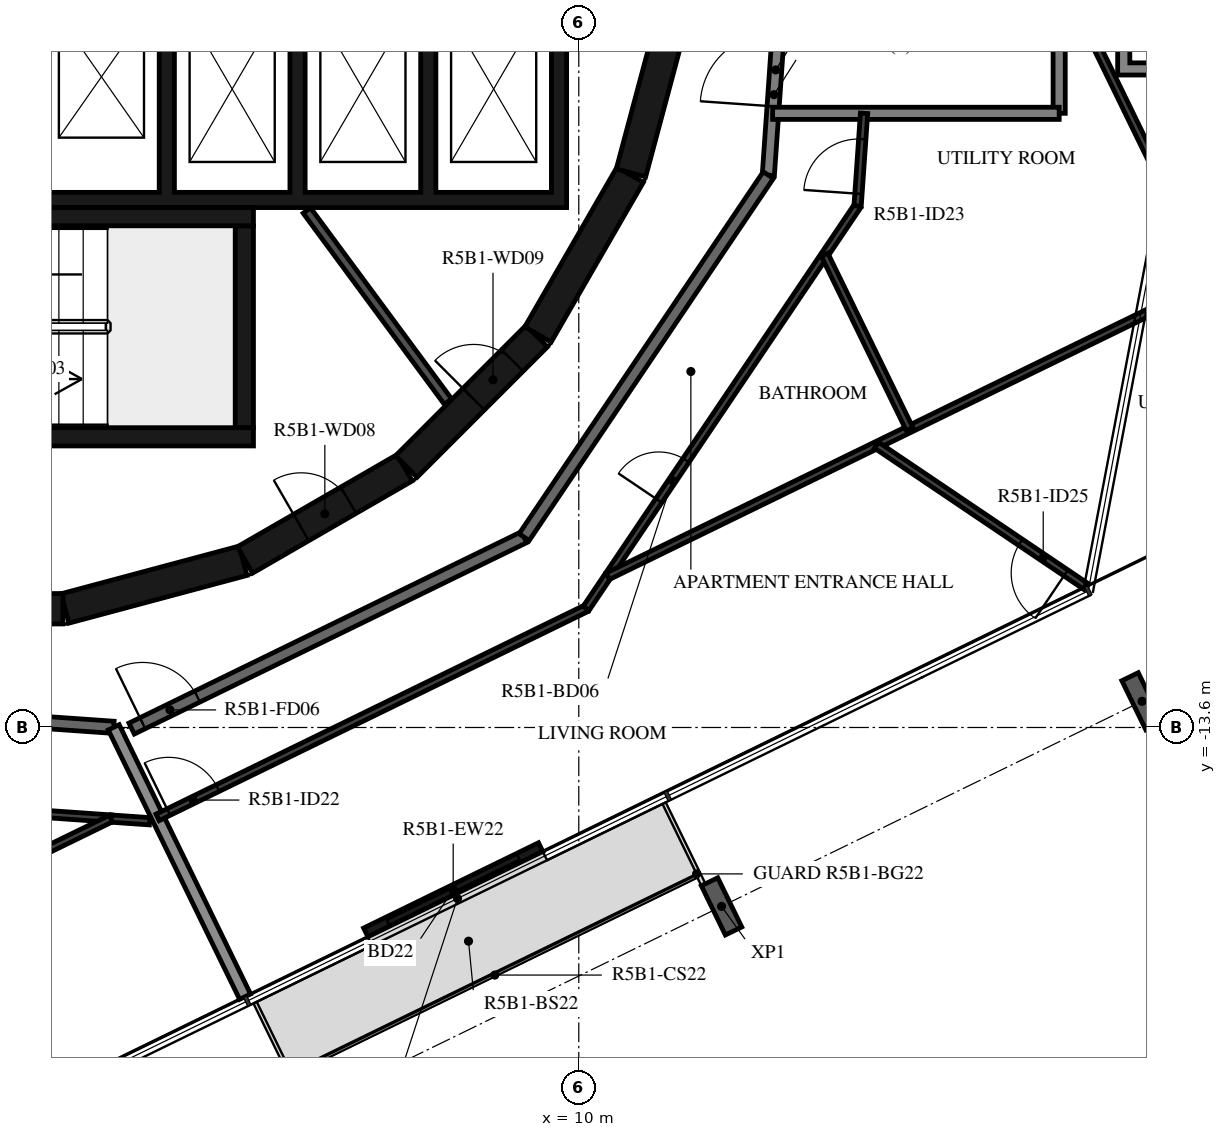
"""IFC4 building model, lengths in metres.
Left out: names, types, materials, properties, quantities, classifications, styles, units other than length and angle.
Written with IfcOpenShell. Run it as: python <this file> out.ifc"""

import sys

from ifc_helpers import new_model, si_unit, direction, frame, frame_2d, origin, origin_2d, place, context, subcontext, project, spatial, polyline, rectangle, i_section, outline, extrude, element, fill, save


model = new_model("IFC4")
c1 = context("Model", 3, precision=1e-05, world=origin(), true_north=direction((0.0, 1.0)))
c2 = subcontext(c1, "Body", "Model", "MODEL_VIEW")
j1 = project(units=[si_unit("LENGTHUNIT", "METRE"), si_unit("PLANEANGLEUNIT", "RADIAN")], contexts=[c1])
p1 = place(None, origin())
s1 = spatial("IfcSite", under=j1, at=p1, CompositionType="ELEMENT")
p2 = place(p1, origin())
s2 = spatial("IfcBuilding", under=s1, at=p2, CompositionType="ELEMENT")
p3 = place(p2, frame((0.0, 0.0, 198.9)))
s3 = spatial("IfcBuildingStorey", under=s2, at=p3, CompositionType="ELEMENT", Elevation=198.9)
for number, where, z_axis, x_axis in (
    (1, (12.348, -16.542, -0.38), (0.0, 0.0, 1.0), (-0.899, -0.438, 0.0)),
    (2, (19.263, -13.169, -0.38), (0.0, 0.0, 1.0), (-0.899, -0.438, 0.0)),
):
    element("IfcColumn", number, at=place(p3, frame(where, z_axis=z_axis, x_axis=x_axis)), inside=s3, PredefinedType="COLUMN", context=c2, shape_type="SweptSolid", body=[
        extrude(i_section(OverallWidth=0.3, OverallDepth=0.9, WebThickness=0.019, FlangeThickness=0.035, FilletRadius=0.03, at=origin_2d()), origin(), (0.0, 0.0, 1.0), 3.5),
    ])
p4 = place(p3, frame((6.497, -16.97, 0.0), z_axis=(0.0, 0.0, 1.0), x_axis=(0.898778711213, 0.43840258698, 0.0)))
e3 = element("IfcWall", 3, at=p4, inside=s3, PredefinedType="STANDARD", context=c2, shape_type="SweptSolid", body=[
    extrude(rectangle(XDim=3.2, YDim=0.16, at=frame_2d((1.6, 0.0))), origin(), (0.0, 0.0, 1.0), 3.12),
])
p5 = place(p4, frame((0.4, 0.0, 0.0)))
e4 = element("IfcOpeningElement", 4, at=p5, cuts=e3, PredefinedType="OPENING", context=c2, shape_type="SweptSolid", body=[
    extrude(rectangle(XDim=2.4, YDim=2.4, at=frame_2d((1.2, 1.2))), frame((0.0, 0.09, 0.0), z_axis=(0.0, -1.0, 0.0), x_axis=(1.0, 0.0, 0.0)), (0.0, 0.0, 1.0), 0.18),
])
p6 = place(p3, frame((1.55, -11.643, 0.0), z_axis=(0.0, 0.0, 1.0), x_axis=(0.965948410781, 0.258734743916, 0.0)))
e5 = element("IfcWall", 5, at=p6, inside=s3, PredefinedType="SHEAR", context=c2, shape_type="SweptSolid", body=[
    extrude(rectangle(XDim=3.033, YDim=0.5, at=frame_2d((1.516, 0.0))), origin(), (0.0, 0.0, 1.0), 3.12),
])
p7 = place(p3, frame((4.51, -10.845, 0.0), z_axis=(0.0, 0.0, 1.0), x_axis=(0.865975092491, 0.500087131594, 0.0)))
e6 = element("IfcWall", 6, at=p7, inside=s3, PredefinedType="SHEAR", context=c2, shape_type="SweptSolid", body=[
    extrude(rectangle(XDim=3.033, YDim=0.5, at=frame_2d((1.516, 0.0))), origin(), (0.0, 0.0, 1.0), 3.12),
])
p8 = place(p7, frame((1.066, 0.0, 0.0)))
e7 = element("IfcOpeningElement", 7, at=p8, cuts=e6, PredefinedType="OPENING", context=c2, shape_type="SweptSolid", body=[
    extrude(rectangle(XDim=0.9, YDim=2.1, at=frame_2d((0.45, 1.05))), frame((0.0, 0.26, 0.0), z_axis=(0.0, -1.0, 0.0), x_axis=(1.0, 0.0, 0.0)), (0.0, 0.0, 1.0), 0.52),
])
p9 = place(p3, frame((7.164, -9.308, 0.0), z_axis=(0.0, 0.0, 1.0), x_axis=(0.707106781187, 0.707106781187, 0.0)))
e8 = element("IfcWall", 8, at=p9, inside=s3, PredefinedType="SHEAR", context=c2, shape_type="SweptSolid", body=[
    extrude(rectangle(XDim=3.032, YDim=0.5, at=frame_2d((1.516, 0.0))), origin(), (0.0, 0.0, 1.0), 3.12),
])
p10 = place(p9, frame((1.566, 0.0, 0.0)))
e9 = element("IfcOpeningElement", 9, at=p10, cuts=e8, PredefinedType="OPENING", context=c2, shape_type="SweptSolid", body=[
    extrude(rectangle(XDim=0.9, YDim=2.1, at=frame_2d((0.45, 1.05))), frame((0.0, 0.26, 0.0), z_axis=(0.0, -1.0, 0.0), x_axis=(1.0, 0.0, 0.0)), (0.0, 0.0, 1.0), 0.52),
])
for number, where, z_axis, x_axis in (
    (10, (9.329, -7.137, 0.0), (0.0, 0.0, 1.0), (0.5, 0.866, 0.0)),
    (11, (10.858, -4.479, 0.0), (0.0, 0.0, 1.0), (0.259, 0.966, 0.0)),
):
    element("IfcWall", number, at=place(p3, frame(where, z_axis=z_axis, x_axis=x_axis)), inside=s3, PredefinedType="SHEAR", context=c2, shape_type="SweptSolid", body=[
        extrude(rectangle(XDim=3.033, YDim=0.5, at=frame_2d((1.516, 0.0))), origin(), (0.0, 0.0, 1.0), 3.12),
    ])
p11 = place(p3, frame((-1.516, -11.647, 0.0), z_axis=(0.0, 0.0, 1.0), x_axis=(1.0, 0.0, 0.0)))
e12 = element("IfcWall", 12, at=p11, inside=s3, PredefinedType="SHEAR", context=c2, shape_type="SweptSolid", body=[
    extrude(rectangle(XDim=3.033, YDim=0.5, at=frame_2d((1.516, 0.0))), origin(), (0.0, 0.0, 1.0), 3.12),
])
p12 = place(p11, frame((0.016, 0.0, 0.0)))
e13 = element("IfcOpeningElement", 13, at=p12, cuts=e12, PredefinedType="OPENING", context=c2, shape_type="SweptSolid", body=[
    extrude(rectangle(XDim=1.2, YDim=2.1, at=frame_2d((0.6, 1.05))), frame((0.0, 0.26, 0.0), z_axis=(0.0, -1.0, 0.0), x_axis=(1.0, 0.0, 0.0)), (0.0, 0.0, 1.0), 0.52),
])
p13 = place(p3, frame((-2.4, -5.2, 0.0), z_axis=(0.0, 0.0, 1.0), x_axis=(1.0, 0.0, 0.0)))
e14 = element("IfcWall", 14, at=p13, inside=s3, PredefinedType="SHEAR", context=c2, shape_type="SweptSolid", body=[
    extrude(rectangle(XDim=7.05, YDim=0.3, at=frame_2d((3.525, 0.0))), origin(), (0.0, 0.0, 1.0), 3.12),
])
p14 = place(p3, frame((4.5, -8.67, 0.0), z_axis=(0.0, 0.0, 1.0), x_axis=(0.0, 1.0, 0.0)))
e15 = element("IfcWall", 15, at=p14, inside=s3, PredefinedType="SHEAR", context=c2, shape_type="SweptSolid", body=[
    extrude(rectangle(XDim=3.32, YDim=0.3, at=frame_2d((1.66, 0.0))), origin(), (0.0, 0.0, 1.0), 3.12),
])
p15 = place(p3, frame((0.1, -8.82, 0.0), z_axis=(0.0, 0.0, 1.0), x_axis=(1.0, 0.0, 0.0)))
e16 = element("IfcWall", 16, at=p15, inside=s3, PredefinedType="SHEAR", context=c2, shape_type="SweptSolid", body=[
    extrude(rectangle(XDim=4.55, YDim=0.3, at=frame_2d((2.275, 0.0))), origin(), (0.0, 0.0, 1.0), 3.12),
])
p16 = place(p3, origin())
e17 = element("IfcWall", 17, at=p16, inside=s3, PredefinedType="SHEAR", context=c2, shape_type="SweptSolid", body=[
    extrude(outline(polyline([(9.8, -5.05), (9.8, -4.8), (9.8, -1.9), (9.55, -1.9), (9.55, -4.8), (7.65, -4.8), (7.65, -1.9), (7.4, -1.9), (7.4, -4.8), (5.5, -4.8), (5.5, -1.9), (5.25, -1.9), (5.25, -4.8), (3.35, -4.8), (3.35, -1.9), (3.1, -1.9), (3.1, -4.8), (1.2, -4.8), (1.2, -1.9), (0.95, -1.9), (0.95, -4.8), (-0.95, -4.8), (-0.95, -1.9), (-1.2, -1.9), (-1.2, -4.8), (-3.1, -4.8), (-3.1, -1.9), (-3.35, -1.9), (-3.35, -4.8), (-5.25, -4.8), (-5.25, -1.9), (-5.5, -1.9), (-5.5, -4.8), (-7.4, -4.8), (-7.4, -1.9), (-7.65, -1.9), (-7.65, -4.8), (-9.55, -4.8), (-9.55, -1.9), (-9.8, -1.9), (-9.8, -4.8), (-9.8, -5.05), (9.8, -5.05)])), origin(), (0.0, 0.0, 1.0), 3.12),
])
p17 = place(p3, frame((5.528, -5.098, 0.0), z_axis=(0.0, 0.0, 1.0), x_axis=(0.594034318069, -0.804439698769, 0.0)))
e18 = element("IfcWall", 18, at=p17, inside=s3, PredefinedType="PARTITIONING", context=c2, shape_type="SweptSolid", body=[
    extrude(rectangle(XDim=3.907, YDim=0.15, at=frame_2d((1.953, 0.0))), origin(), (0.0, 0.0, 1.0), 3.12),
])
p18 = place(p3, frame((13.117, -4.517, 0.0), z_axis=(0.0, 0.0, 1.0), x_axis=(0.069736659613, 0.997565435601, 0.0)))
e19 = element("IfcWall", 19, at=p18, inside=s3, PredefinedType="STANDARD", context=c2, shape_type="SweptSolid", body=[
    extrude(rectangle(XDim=2.654, YDim=0.2, at=frame_2d((1.327, 0.0))), origin(), (0.0, 0.0, 1.0), 3.12),
])
p19 = place(p18, frame((1.134, 0.0, 0.0)))
e20 = element("IfcOpeningElement", 20, at=p19, cuts=e19, PredefinedType="OPENING", context=c2, shape_type="SweptSolid", body=[
    extrude(rectangle(XDim=1.2, YDim=2.1, at=frame_2d((0.6, 1.05))), frame((0.0, 0.11, 0.0), z_axis=(0.0, -1.0, 0.0), x_axis=(1.0, 0.0, 0.0)), (0.0, 0.0, 1.0), 0.22),
])
p20 = place(p3, frame((-4.517, -13.117, 0.0), z_axis=(0.0, 0.0, 1.0), x_axis=(0.997564669554, -0.069747616856, 0.0)))
e21 = element("IfcWall", 21, at=p20, inside=s3, PredefinedType="STANDARD", context=c2, shape_type="SweptSolid", body=[
    extrude(rectangle(XDim=6.885, YDim=0.2, at=frame_2d((3.443, 0.0))), origin(), (0.0, 0.0, 1.0), 3.12),
])
p21 = place(p20, frame((3.2, 0.0, 0.0)))
e22 = element("IfcOpeningElement", 22, at=p21, cuts=e21, PredefinedType="OPENING", context=c2, shape_type="SweptSolid", body=[
    extrude(rectangle(XDim=1.0, YDim=2.1, at=frame_2d((0.5, 1.05))), frame((0.0, 0.11, 0.0), z_axis=(0.0, -1.0, 0.0), x_axis=(1.0, 0.0, 0.0)), (0.0, 0.0, 1.0), 0.22),
])
p22 = place(p3, frame((2.647, -13.618, 0.0), z_axis=(0.0, 0.0, 1.0), x_axis=(0.898796543751, 0.438366026218, 0.0)))
e23 = element("IfcWall", 23, at=p22, inside=s3, PredefinedType="STANDARD", context=c2, shape_type="SweptSolid", body=[
    extrude(rectangle(XDim=7.181, YDim=0.2, at=frame_2d((3.591, 0.0))), origin(), (0.0, 0.0, 1.0), 3.12),
])
p23 = place(p22, frame((0.2, 0.0, 0.0)))
e24 = element("IfcOpeningElement", 24, at=p23, cuts=e23, PredefinedType="OPENING", context=c2, shape_type="SweptSolid", body=[
    extrude(rectangle(XDim=1.0, YDim=2.1, at=frame_2d((0.5, 1.05))), frame((0.0, 0.11, 0.0), z_axis=(0.0, -1.0, 0.0), x_axis=(1.0, 0.0, 0.0)), (0.0, 0.0, 1.0), 0.22),
])
p24 = place(p3, frame((9.101, -10.47, 0.0), z_axis=(0.0, 0.0, 1.0), x_axis=(0.559195469534, 0.829035841718, 0.0)))
e25 = element("IfcWall", 25, at=p24, inside=s3, PredefinedType="STANDARD", context=c2, shape_type="SweptSolid", body=[
    extrude(rectangle(XDim=7.181, YDim=0.2, at=frame_2d((3.591, 0.0))), origin(), (0.0, 0.0, 1.0), 3.12),
])
p25 = place(p3, frame((17.9, -3.5, 0.0), z_axis=(0.0, 0.0, 1.0), x_axis=(0.0, 1.0, 0.0)))
e26 = element("IfcWall", 26, at=p25, inside=s3, PredefinedType="STANDARD", context=c2, shape_type="SweptSolid", body=[
    extrude(rectangle(XDim=7.0, YDim=0.2, at=frame_2d((3.5, 0.0))), origin(), (0.0, 0.0, 1.0), 3.12),
])
p26 = place(p3, frame((13.188, -3.5, 0.0), z_axis=(0.0, 0.0, 1.0), x_axis=(1.0, 0.0, 0.0)))
e27 = element("IfcWall", 27, at=p26, inside=s3, PredefinedType="STANDARD", context=c2, shape_type="SweptSolid", body=[
    extrude(rectangle(XDim=4.712, YDim=0.2, at=frame_2d((2.356, 0.0))), origin(), (0.0, 0.0, 1.0), 3.12),
])
p27 = place(p3, frame((4.512, -18.027, 0.0), z_axis=(0.0, 0.0, 1.0), x_axis=(-0.438374835386, 0.898792247241, 0.0)))
e28 = element("IfcWall", 28, at=p27, inside=s3, PredefinedType="STANDARD", context=c2, shape_type="SweptSolid", body=[
    extrude(rectangle(XDim=4.929, YDim=0.2, at=frame_2d((2.464, 0.0))), origin(), (0.0, 0.0, 1.0), 2.73),
])
p28 = place(p3, frame((-5.022, -14.585, 0.0), z_axis=(0.0, 0.0, 1.0), x_axis=(0.997564196041, -0.06975438895, 0.0)))
e29 = element("IfcWall", 29, at=p28, inside=s3, PredefinedType="PARTITIONING", context=c2, shape_type="SweptSolid", body=[
    extrude(rectangle(XDim=7.346, YDim=0.12, at=frame_2d((3.673, 0.0))), origin(), (0.0, 0.0, 1.0), 3.12),
])
p29 = place(p28, frame((1.37, 0.0, 0.0)))
e30 = element("IfcOpeningElement", 30, at=p29, cuts=e29, PredefinedType="OPENING", context=c2, shape_type="SweptSolid", body=[
    extrude(rectangle(XDim=0.8, YDim=2.1, at=frame_2d((0.4, 1.05))), frame((0.0, 0.07, 0.0), z_axis=(0.0, -1.0, 0.0), x_axis=(1.0, 0.0, 0.0)), (0.0, 0.0, 1.0), 0.14),
])
p30 = place(p3, frame((2.306, -15.098, 0.0), z_axis=(0.0, 0.0, 1.0), x_axis=(0.99757571817, -0.069589413839, 0.0)))
e31 = element("IfcWall", 31, at=p30, inside=s3, PredefinedType="PARTITIONING", context=c2, shape_type="SweptSolid", body=[
    extrude(rectangle(XDim=0.638, YDim=0.12, at=frame_2d((0.319, 0.0))), origin(), (0.0, 0.0, 1.0), 3.12),
])
p31 = place(p3, frame((-9.269, -20.743, 0.0), z_axis=(0.0, 0.0, 1.0), x_axis=(0.898796865831, 0.438365365846, 0.0)))
e32 = element("IfcWall", 32, at=p31, inside=s3, PredefinedType="PARTITIONING", context=c2, shape_type="SweptSolid", body=[
    extrude(rectangle(XDim=12.879, YDim=0.12, at=frame_2d((6.439, 0.0))), origin(), (0.0, 0.0, 1.0), 3.12),
])
p32 = place(p31, frame((2.395, 0.0, 0.0)))
e33 = element("IfcOpeningElement", 33, at=p32, cuts=e32, PredefinedType="OPENING", context=c2, shape_type="SweptSolid", body=[
    extrude(rectangle(XDim=0.9, YDim=2.1, at=frame_2d((0.45, 1.05))), frame((0.0, 0.07, 0.0), z_axis=(0.0, -1.0, 0.0), x_axis=(1.0, 0.0, 0.0)), (0.0, 0.0, 1.0), 0.14),
])
p33 = place(p3, frame((3.074, -15.078, 0.0), z_axis=(0.0, 0.0, 1.0), x_axis=(0.898793586225, 0.43837209008, 0.0)))
e34 = element("IfcWall", 34, at=p33, inside=s3, PredefinedType="PARTITIONING", context=c2, shape_type="SweptSolid", body=[
    extrude(rectangle(XDim=7.839, YDim=0.12, at=frame_2d((3.92, 0.0))), origin(), (0.0, 0.0, 1.0), 3.12),
])
p34 = place(p33, frame((0.2, 0.0, 0.0)))
e35 = element("IfcOpeningElement", 35, at=p34, cuts=e34, PredefinedType="OPENING", context=c2, shape_type="SweptSolid", body=[
    extrude(rectangle(XDim=0.9, YDim=2.1, at=frame_2d((0.45, 1.05))), frame((0.0, 0.07, 0.0), z_axis=(0.0, -1.0, 0.0), x_axis=(1.0, 0.0, 0.0)), (0.0, 0.0, 1.0), 0.14),
])
p35 = place(p3, frame((10.12, -11.642, 0.0), z_axis=(0.0, 0.0, 1.0), x_axis=(0.55920080659, 0.829032241779, 0.0)))
e36 = element("IfcWall", 36, at=p35, inside=s3, PredefinedType="PARTITIONING", context=c2, shape_type="SweptSolid", body=[
    extrude(rectangle(XDim=7.985, YDim=0.12, at=frame_2d((3.992, 0.0))), origin(), (0.0, 0.0, 1.0), 3.12),
])
p36 = place(p35, frame((2.138, 0.0, 0.0)))
e37 = element("IfcOpeningElement", 37, at=p36, cuts=e36, PredefinedType="OPENING", context=c2, shape_type="SweptSolid", body=[
    extrude(rectangle(XDim=0.8, YDim=2.1, at=frame_2d((0.4, 1.05))), frame((0.0, 0.07, 0.0), z_axis=(0.0, -1.0, 0.0), x_axis=(1.0, 0.0, 0.0)), (0.0, 0.0, 1.0), 0.14),
])
p37 = place(p3, frame((14.585, -5.022, 0.0), z_axis=(0.0, 0.0, 1.0), x_axis=(0.069757481187, 0.997563979812, 0.0)))
e38 = element("IfcWall", 38, at=p37, inside=s3, PredefinedType="PARTITIONING", context=c2, shape_type="SweptSolid", body=[
    extrude(rectangle(XDim=1.526, YDim=0.12, at=frame_2d((0.763, 0.0))), origin(), (0.0, 0.0, 1.0), 3.12),
])
p38 = place(p37, frame((0.2, 0.0, 0.0)))
e39 = element("IfcOpeningElement", 39, at=p38, cuts=e38, PredefinedType="OPENING", context=c2, shape_type="SweptSolid", body=[
    extrude(rectangle(XDim=0.9, YDim=2.1, at=frame_2d((0.45, 1.05))), frame((0.0, 0.07, 0.0), z_axis=(0.0, -1.0, 0.0), x_axis=(1.0, 0.0, 0.0)), (0.0, 0.0, 1.0), 0.14),
])
p39 = place(p3, frame((22.052, -5.467, 0.0), z_axis=(0.0, 0.0, 1.0), x_axis=(-0.898796865831, -0.438365365846, 0.0)))
e40 = element("IfcWall", 40, at=p39, inside=s3, PredefinedType="PARTITIONING", context=c2, shape_type="SweptSolid", body=[
    extrude(rectangle(XDim=12.879, YDim=0.12, at=frame_2d((6.439, 0.0))), origin(), (0.0, 0.0, 1.0), 3.12),
])
p40 = place(p3, frame((18.343, -11.282, 0.0), z_axis=(0.0, 0.0, 1.0), x_axis=(-0.829047434778, 0.559178281845, 0.0)))
e41 = element("IfcWall", 41, at=p40, inside=s3, PredefinedType="PARTITIONING", context=c2, shape_type="SweptSolid", body=[
    extrude(rectangle(XDim=4.157, YDim=0.12, at=frame_2d((2.079, 0.0))), origin(), (0.0, 0.0, 1.0), 3.12),
])
p41 = place(p40, frame((0.4, 0.0, 0.0)))
e42 = element("IfcOpeningElement", 42, at=p41, cuts=e41, PredefinedType="OPENING", context=c2, shape_type="SweptSolid", body=[
    extrude(rectangle(XDim=0.9, YDim=2.1, at=frame_2d((0.45, 1.05))), frame((0.0, 0.07, 0.0), z_axis=(0.0, -1.0, 0.0), x_axis=(1.0, 0.0, 0.0)), (0.0, 0.0, 1.0), 0.14),
])
p42 = place(p3, frame((15.44, -8.692, 0.0), z_axis=(0.0, 0.0, 1.0), x_axis=(-0.438339139088, 0.898809656792, 0.0)))
e43 = element("IfcWall", 43, at=p42, inside=s3, PredefinedType="PARTITIONING", context=c2, shape_type="SweptSolid", body=[
    extrude(rectangle(XDim=3.188, YDim=0.12, at=frame_2d((1.594, 0.0))), origin(), (0.0, 0.0, 1.0), 3.12),
])
p43 = place(p3, frame((20.403, -6.271, 0.0), z_axis=(0.0, 0.0, 1.0), x_axis=(-0.438371913736, 0.898793672234, 0.0)))
e44 = element("IfcWall", 44, at=p43, inside=s3, PredefinedType="PARTITIONING", context=c2, shape_type="SweptSolid", body=[
    extrude(rectangle(XDim=5.58, YDim=0.12, at=frame_2d((2.79, 0.0))), origin(), (0.0, 0.0, 1.0), 3.12),
])
p44 = place(p43, frame((0.2, 0.0, 0.0)))
e45 = element("IfcOpeningElement", 45, at=p44, cuts=e44, PredefinedType="OPENING", context=c2, shape_type="SweptSolid", body=[
    extrude(rectangle(XDim=0.9, YDim=2.1, at=frame_2d((0.45, 1.05))), frame((0.0, 0.07, 0.0), z_axis=(0.0, -1.0, 0.0), x_axis=(1.0, 0.0, 0.0)), (0.0, 0.0, 1.0), 0.14),
])
p45 = place(p3, origin())
e46 = element("IfcWall", 46, at=p45, inside=s3, PredefinedType="STANDARD", context=c2, shape_type="SweptSolid", body=[
    extrude(outline(polyline([(21.762, 0.03), (21.762, -2.87), (18.862, -2.87), (18.862, 0.03), (21.762, 0.03)]), holes=[polyline([(19.062, -2.67), (21.562, -2.67), (21.562, -0.17), (19.062, -0.17), (19.062, -2.67)])]), origin(), (0.0, 0.0, 1.0), 3.12),
])
p46 = place(p5, origin())
e47 = element("IfcDoor", 47, at=p46, inside=s3, OperationType="DOUBLE_DOOR_SLIDING", PredefinedType="DOOR", context=c2, shape_type="SweptSolid", body=[
    extrude(rectangle(XDim=2.4, YDim=2.4, at=frame_2d((1.2, 1.2))), frame((0.0, 0.025, 0.0), z_axis=(0.0, -1.0, 0.0), x_axis=(1.0, 0.0, 0.0)), (0.0, 0.0, 1.0), 0.05),
])
fill(e4, e47)
p47 = place(p8, origin())
e48 = element("IfcDoor", 48, at=p47, inside=s3, OperationType="SINGLE_SWING_RIGHT", PredefinedType="DOOR", context=c2, shape_type="SweptSolid", body=[
    extrude(rectangle(XDim=0.9, YDim=2.1, at=frame_2d((0.45, 1.05))), frame((0.0, 0.025, 0.0), z_axis=(0.0, -1.0, 0.0), x_axis=(1.0, 0.0, 0.0)), (0.0, 0.0, 1.0), 0.05),
])
fill(e7, e48)
p48 = place(p10, origin())
e49 = element("IfcDoor", 49, at=p48, inside=s3, OperationType="SINGLE_SWING_LEFT", PredefinedType="DOOR", context=c2, shape_type="SweptSolid", body=[
    extrude(rectangle(XDim=0.9, YDim=2.1, at=frame_2d((0.45, 1.05))), frame((0.0, 0.025, 0.0), z_axis=(0.0, -1.0, 0.0), x_axis=(1.0, 0.0, 0.0)), (0.0, 0.0, 1.0), 0.05),
])
fill(e9, e49)
p49 = place(p23, origin())
e50 = element("IfcDoor", 50, at=p49, inside=s3, OperationType="SINGLE_SWING_LEFT", PredefinedType="DOOR", context=c2, shape_type="SweptSolid", body=[
    extrude(rectangle(XDim=1.0, YDim=2.1, at=frame_2d((0.5, 1.05))), frame((0.0, 0.025, 0.0), z_axis=(0.0, -1.0, 0.0), x_axis=(1.0, 0.0, 0.0)), (0.0, 0.0, 1.0), 0.05),
])
fill(e24, e50)
p50 = place(p34, origin())
e51 = element("IfcDoor", 51, at=p50, inside=s3, OperationType="SINGLE_SWING_LEFT", PredefinedType="DOOR", context=c2, shape_type="SweptSolid", body=[
    extrude(rectangle(XDim=0.9, YDim=2.1, at=frame_2d((0.45, 1.05))), frame((0.0, 0.025, 0.0), z_axis=(0.0, -1.0, 0.0), x_axis=(1.0, 0.0, 0.0)), (0.0, 0.0, 1.0), 0.05),
])
fill(e35, e51)
p51 = place(p36, origin())
e52 = element("IfcDoor", 52, at=p51, inside=s3, OperationType="SINGLE_SWING_RIGHT", PredefinedType="DOOR", context=c2, shape_type="SweptSolid", body=[
    extrude(rectangle(XDim=0.8, YDim=2.1, at=frame_2d((0.4, 1.05))), frame((0.0, 0.025, 0.0), z_axis=(0.0, -1.0, 0.0), x_axis=(1.0, 0.0, 0.0)), (0.0, 0.0, 1.0), 0.05),
])
fill(e37, e52)
p52 = place(p38, origin())
e53 = element("IfcDoor", 53, at=p52, inside=s3, OperationType="SINGLE_SWING_RIGHT", PredefinedType="DOOR", context=c2, shape_type="SweptSolid", body=[
    extrude(rectangle(XDim=0.9, YDim=2.1, at=frame_2d((0.45, 1.05))), frame((0.0, 0.025, 0.0), z_axis=(0.0, -1.0, 0.0), x_axis=(1.0, 0.0, 0.0)), (0.0, 0.0, 1.0), 0.05),
])
fill(e39, e53)
p53 = place(p41, origin())
e54 = element("IfcDoor", 54, at=p53, inside=s3, OperationType="SINGLE_SWING_RIGHT", PredefinedType="DOOR", context=c2, shape_type="SweptSolid", body=[
    extrude(rectangle(XDim=0.9, YDim=2.1, at=frame_2d((0.45, 1.05))), frame((0.0, 0.025, 0.0), z_axis=(0.0, -1.0, 0.0), x_axis=(1.0, 0.0, 0.0)), (0.0, 0.0, 1.0), 0.05),
])
fill(e42, e54)
p54 = place(p19, origin())
e55 = element("IfcDoor", 55, at=p54, inside=s3, OperationType="DOUBLE_DOOR_SINGLE_SWING", PredefinedType="DOOR", context=c2, shape_type="SweptSolid", body=[
    extrude(rectangle(XDim=1.2, YDim=2.1, at=frame_2d((0.6, 1.05))), frame((0.0, 0.025, 0.0), z_axis=(0.0, -1.0, 0.0), x_axis=(1.0, 0.0, 0.0)), (0.0, 0.0, 1.0), 0.05),
])
fill(e20, e55)
save(model, sys.argv[1])
